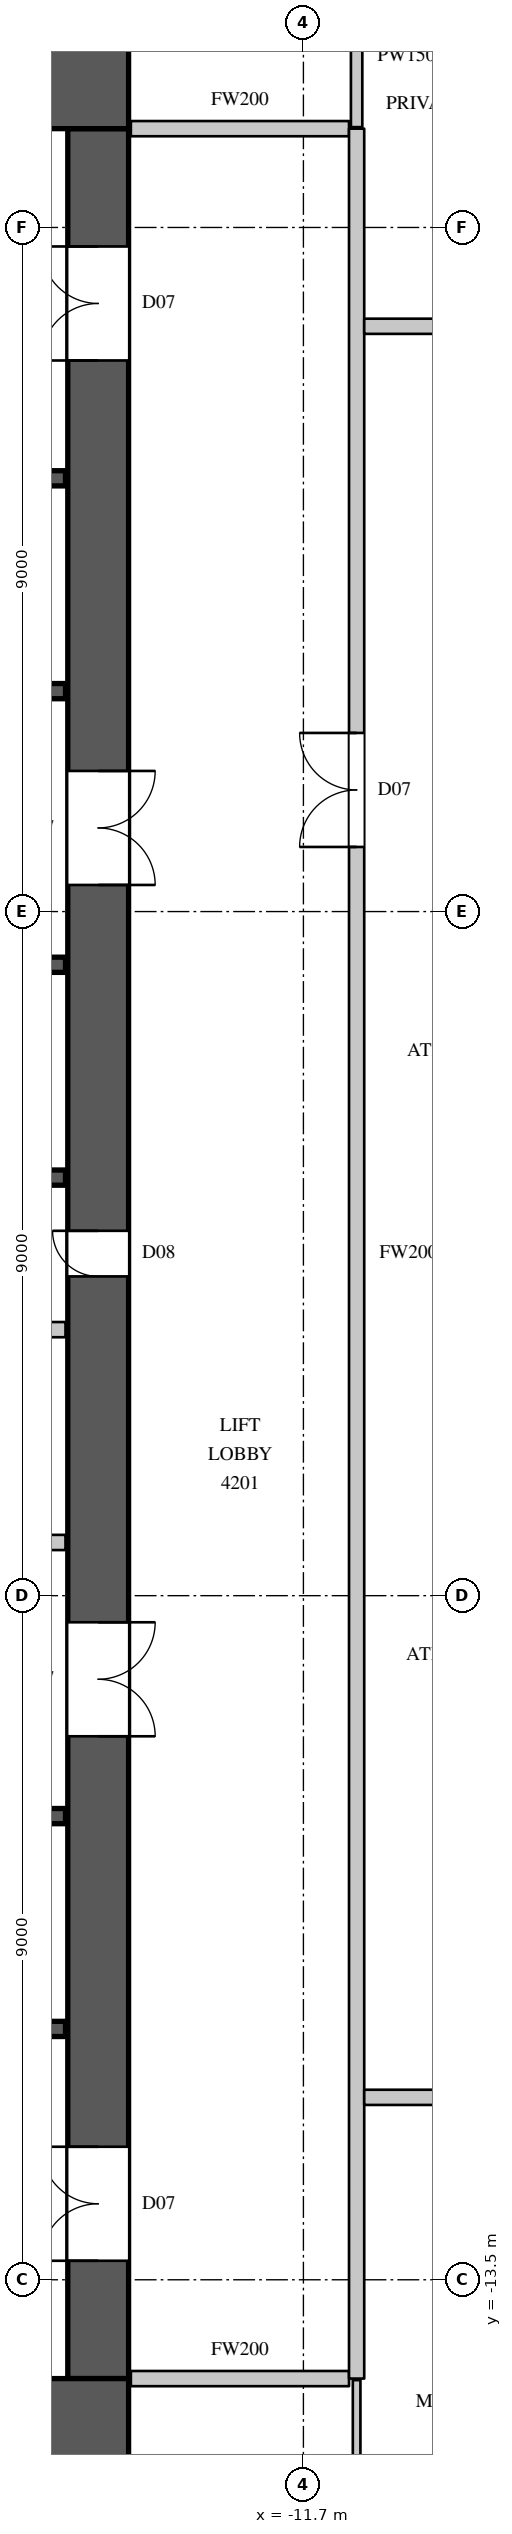
"""IFC4 building model, lengths in metres.
Left out: names, types, materials, properties, quantities, classifications, styles, units other than length and angle.
Written with IfcOpenShell. Run it as: python <this file> out.ifc"""

import sys

from ifc_helpers import new_model, si_unit, direction, frame, frame_2d, origin, place, context, subcontext, project, spatial, rectangle, extrude, element, fill, save


model = new_model("IFC4")
c1 = context("Model", 3, precision=1e-05, world=origin(), true_north=direction((0.0, 1.0)))
c2 = subcontext(c1, "Body", "Model", "MODEL_VIEW")
j1 = project(units=[si_unit("LENGTHUNIT", "METRE"), si_unit("PLANEANGLEUNIT", "RADIAN")], contexts=[c1])
p1 = place(None, origin())
s1 = spatial("IfcSite", under=j1, at=p1, CompositionType="ELEMENT")
p2 = place(p1, origin())
s2 = spatial("IfcBuilding", under=s1, at=p2, CompositionType="ELEMENT")
p3 = place(p2, frame((0.0, 0.0, 193.3)))
s3 = spatial("IfcBuildingStorey", under=s2, at=p3, CompositionType="ELEMENT", Elevation=193.3)
for number, where, z_axis, x_axis in (
    (1, (-30.0, 15.4, 0.0), (0.0, 0.0, 1.0), (1.0, 0.0, 0.0)),
    (2, (-30.0, -15.4, 0.0), (0.0, 0.0, 1.0), (1.0, 0.0, 0.0)),
):
    element("IfcWall", number, at=place(p3, frame(where, z_axis=z_axis, x_axis=x_axis)), inside=s3, PredefinedType="SHEAR", context=c2, shape_type="SweptSolid", body=[
        extrude(rectangle(XDim=16.0, YDim=1.2, at=frame_2d((8.0, 0.0))), origin(), (0.0, 0.0, 1.0), 4.1),
    ])
p4 = place(p3, frame((-14.4, -14.8, 0.0), z_axis=(0.0, 0.0, 1.0), x_axis=(0.0, 1.0, 0.0)))
e3 = element("IfcWall", 3, at=p4, inside=s3, PredefinedType="SHEAR", context=c2, shape_type="SweptSolid", body=[
    extrude(rectangle(XDim=29.6, YDim=0.8, at=frame_2d((14.8, 0.0))), origin(), (0.0, 0.0, 1.0), 4.1),
])
p5 = place(p4, frame((1.55, 0.0, 0.0)))
e4 = element("IfcOpeningElement", 4, at=p5, cuts=e3, PredefinedType="OPENING", context=c2, shape_type="SweptSolid", body=[
    extrude(rectangle(XDim=1.5, YDim=2.4, at=frame_2d((0.75, 1.2))), frame((0.0, 0.41, 0.0), z_axis=(0.0, -1.0, 0.0), x_axis=(1.0, 0.0, 0.0)), (0.0, 0.0, 1.0), 0.82),
])
p6 = place(p4, frame((26.55, 0.0, 0.0)))
e5 = element("IfcOpeningElement", 5, at=p6, cuts=e3, PredefinedType="OPENING", context=c2, shape_type="SweptSolid", body=[
    extrude(rectangle(XDim=1.5, YDim=2.4, at=frame_2d((0.75, 1.2))), frame((0.0, 0.41, 0.0), z_axis=(0.0, -1.0, 0.0), x_axis=(1.0, 0.0, 0.0)), (0.0, 0.0, 1.0), 0.82),
])
p7 = place(p4, frame((8.45, 0.0, 0.0)))
e6 = element("IfcOpeningElement", 6, at=p7, cuts=e3, PredefinedType="OPENING", context=c2, shape_type="SweptSolid", body=[
    extrude(rectangle(XDim=1.5, YDim=2.4, at=frame_2d((0.75, 1.2))), frame((0.0, 0.41, 0.0), z_axis=(0.0, -1.0, 0.0), x_axis=(1.0, 0.0, 0.0)), (0.0, 0.0, 1.0), 0.82),
])
p8 = place(p4, frame((19.65, 0.0, 0.0)))
e7 = element("IfcOpeningElement", 7, at=p8, cuts=e3, PredefinedType="OPENING", context=c2, shape_type="SweptSolid", body=[
    extrude(rectangle(XDim=1.5, YDim=2.4, at=frame_2d((0.75, 1.2))), frame((0.0, 0.41, 0.0), z_axis=(0.0, -1.0, 0.0), x_axis=(1.0, 0.0, 0.0)), (0.0, 0.0, 1.0), 0.82),
])
p9 = place(p4, frame((14.5, 0.0, 0.0)))
e8 = element("IfcOpeningElement", 8, at=p9, cuts=e3, PredefinedType="OPENING", context=c2, shape_type="SweptSolid", body=[
    extrude(rectangle(XDim=0.6, YDim=2.0, at=frame_2d((0.3, 1.0))), frame((0.0, 0.41, 0.0), z_axis=(0.0, -1.0, 0.0), x_axis=(1.0, 0.0, 0.0)), (0.0, 0.0, 1.0), 0.82),
])
p10 = place(p3, frame((-23.02, -3.8, 0.0), z_axis=(0.0, 0.0, 1.0), x_axis=(1.0, 0.0, 0.0)))
e9 = element("IfcWall", 9, at=p10, inside=s3, PredefinedType="PARTITIONING", context=c2, shape_type="SweptSolid", body=[
    extrude(rectangle(XDim=8.19, YDim=0.2, at=frame_2d((4.095, 0.0))), origin(), (0.0, 0.0, 1.0), 3.8),
])
p11 = place(p10, frame((1.5, 0.0, 0.0)))
e10 = element("IfcOpeningElement", 10, at=p11, cuts=e9, PredefinedType="OPENING", context=c2, shape_type="SweptSolid", body=[
    extrude(rectangle(XDim=0.9, YDim=2.2, at=frame_2d((0.45, 1.1))), frame((0.0, 0.11, 0.0), z_axis=(0.0, -1.0, 0.0), x_axis=(1.0, 0.0, 0.0)), (0.0, 0.0, 1.0), 0.22),
])
p12 = place(p10, frame((5.45, 0.0, 0.0)))
e11 = element("IfcOpeningElement", 11, at=p12, cuts=e9, PredefinedType="OPENING", context=c2, shape_type="SweptSolid", body=[
    extrude(rectangle(XDim=0.9, YDim=2.2, at=frame_2d((0.45, 1.1))), frame((0.0, 0.11, 0.0), z_axis=(0.0, -1.0, 0.0), x_axis=(1.0, 0.0, 0.0)), (0.0, 0.0, 1.0), 0.22),
])
for number, where, z_axis, x_axis in (
    (12, (-13.97, -14.8, 0.0), (0.0, 0.0, 1.0), (1.0, 0.0, 0.0)),
    (13, (-13.97, 14.8, 0.0), (0.0, 0.0, 1.0), (1.0, 0.0, 0.0)),
):
    element("IfcWall", number, at=place(p3, frame(where, z_axis=z_axis, x_axis=x_axis)), inside=s3, PredefinedType="PARTITIONING", context=c2, shape_type="SweptSolid", body=[
        extrude(rectangle(XDim=2.87, YDim=0.2, at=frame_2d((1.435, 0.0))), origin(), (0.0, 0.0, 1.0), 3.8),
    ])
p13 = place(p3, frame((-11.0, -14.8, 0.0), z_axis=(0.0, 0.0, 1.0), x_axis=(0.0, 1.0, 0.0)))
e14 = element("IfcWall", 14, at=p13, inside=s3, PredefinedType="PARTITIONING", context=c2, shape_type="SweptSolid", body=[
    extrude(rectangle(XDim=29.6, YDim=0.2, at=frame_2d((14.8, 0.0))), origin(), (0.0, 0.0, 1.0), 3.8),
])
p14 = place(p13, frame((20.15, 0.0, 0.0)))
e15 = element("IfcOpeningElement", 15, at=p14, cuts=e14, PredefinedType="OPENING", context=c2, shape_type="SweptSolid", body=[
    extrude(rectangle(XDim=1.5, YDim=2.4, at=frame_2d((0.75, 1.2))), frame((0.0, 0.11, 0.0), z_axis=(0.0, -1.0, 0.0), x_axis=(1.0, 0.0, 0.0)), (0.0, 0.0, 1.0), 0.22),
])
p15 = place(p3, frame((-10.9, -11.1, 0.0), z_axis=(0.0, 0.0, 1.0), x_axis=(1.0, 0.0, 0.0)))
e16 = element("IfcWall", 16, at=p15, inside=s3, PredefinedType="PARTITIONING", context=c2, shape_type="SweptSolid", body=[
    extrude(rectangle(XDim=20.9, YDim=0.2, at=frame_2d((10.45, 0.0))), origin(), (0.0, 0.0, 1.0), 3.8),
])
p16 = place(p15, frame((1.1, 0.0, 0.0)))
e17 = element("IfcOpeningElement", 17, at=p16, cuts=e16, PredefinedType="OPENING", context=c2, shape_type="SweptSolid", body=[
    extrude(rectangle(XDim=0.9, YDim=2.2, at=frame_2d((0.45, 1.1))), frame((0.0, 0.11, 0.0), z_axis=(0.0, -1.0, 0.0), x_axis=(1.0, 0.0, 0.0)), (0.0, 0.0, 1.0), 0.22),
])
p17 = place(p15, frame((4.9, 0.0, 0.0)))
e18 = element("IfcOpeningElement", 18, at=p17, cuts=e16, PredefinedType="OPENING", context=c2, shape_type="SweptSolid", body=[
    extrude(rectangle(XDim=0.9, YDim=2.2, at=frame_2d((0.45, 1.1))), frame((0.0, 0.11, 0.0), z_axis=(0.0, -1.0, 0.0), x_axis=(1.0, 0.0, 0.0)), (0.0, 0.0, 1.0), 0.22),
])
p18 = place(p15, frame((7.25, 0.0, 0.0)))
e19 = element("IfcOpeningElement", 19, at=p18, cuts=e16, PredefinedType="OPENING", context=c2, shape_type="SweptSolid", body=[
    extrude(rectangle(XDim=0.9, YDim=2.2, at=frame_2d((0.45, 1.1))), frame((0.0, 0.11, 0.0), z_axis=(0.0, -1.0, 0.0), x_axis=(1.0, 0.0, 0.0)), (0.0, 0.0, 1.0), 0.22),
])
p19 = place(p15, frame((9.95, 0.0, 0.0)))
e20 = element("IfcOpeningElement", 20, at=p19, cuts=e16, PredefinedType="OPENING", context=c2, shape_type="SweptSolid", body=[
    extrude(rectangle(XDim=1.1, YDim=2.4, at=frame_2d((0.55, 1.2))), frame((0.0, 0.11, 0.0), z_axis=(0.0, -1.0, 0.0), x_axis=(1.0, 0.0, 0.0)), (0.0, 0.0, 1.0), 0.22),
])
p20 = place(p15, frame((16.3, 0.0, 0.0)))
e21 = element("IfcOpeningElement", 21, at=p20, cuts=e16, PredefinedType="OPENING", context=c2, shape_type="SweptSolid", body=[
    extrude(rectangle(XDim=1.1, YDim=2.4, at=frame_2d((0.55, 1.2))), frame((0.0, 0.11, 0.0), z_axis=(0.0, -1.0, 0.0), x_axis=(1.0, 0.0, 0.0)), (0.0, 0.0, 1.0), 0.22),
])
p21 = place(p3, frame((-10.9, 12.2, 0.0), z_axis=(0.0, 0.0, 1.0), x_axis=(1.0, 0.0, 0.0)))
e22 = element("IfcWall", 22, at=p21, inside=s3, PredefinedType="PARTITIONING", context=c2, shape_type="SweptSolid", body=[
    extrude(rectangle(XDim=3.704, YDim=0.2, at=frame_2d((1.852, 0.0))), origin(), (0.0, 0.0, 1.0), 3.8),
])
p22 = place(p21, frame((1.7, 0.0, 0.0)))
e23 = element("IfcOpeningElement", 23, at=p22, cuts=e22, PredefinedType="OPENING", context=c2, shape_type="SweptSolid", body=[
    extrude(rectangle(XDim=1.1, YDim=2.4, at=frame_2d((0.55, 1.2))), frame((0.0, 0.11, 0.0), z_axis=(0.0, -1.0, 0.0), x_axis=(1.0, 0.0, 0.0)), (0.0, 0.0, 1.0), 0.22),
])
p23 = place(p3, frame((-11.0, 14.82, 0.0), z_axis=(0.0, 0.0, 1.0), x_axis=(0.0, 1.0, 0.0)))
e24 = element("IfcWall", 24, at=p23, inside=s3, PredefinedType="PARTITIONING", context=c2, shape_type="SweptSolid", body=[
    extrude(rectangle(XDim=1.88, YDim=0.15, at=frame_2d((0.94, 0.0))), origin(), (0.0, 0.0, 1.0), 3.8),
])
p24 = place(p3, frame((-29.17, -1.0, 0.0), z_axis=(0.0, 0.0, 1.0), x_axis=(1.0, 0.0, 0.0)))
e25 = element("IfcWall", 25, at=p24, inside=s3, PredefinedType="PARTITIONING", context=c2, shape_type="SweptSolid", body=[
    extrude(rectangle(XDim=14.34, YDim=0.2, at=frame_2d((7.17, 0.0))), origin(), (0.0, 0.0, 1.0), 3.8),
])
p25 = place(p3, frame((-26.08, 1.0, 0.0), z_axis=(0.0, 0.0, 1.0), x_axis=(1.0, 0.0, 0.0)))
e26 = element("IfcWall", 26, at=p25, inside=s3, PredefinedType="SHEAR", context=c2, shape_type="SweptSolid", body=[
    extrude(rectangle(XDim=11.25, YDim=0.2, at=frame_2d((5.625, 0.0))), origin(), (0.0, 0.0, 1.0), 3.8),
])
p26 = place(p3, frame((-26.08, 3.8, 0.0), z_axis=(0.0, 0.0, 1.0), x_axis=(1.0, 0.0, 0.0)))
e27 = element("IfcWall", 27, at=p26, inside=s3, PredefinedType="SHEAR", context=c2, shape_type="SweptSolid", body=[
    extrude(rectangle(XDim=11.25, YDim=0.2, at=frame_2d((5.625, 0.0))), origin(), (0.0, 0.0, 1.0), 3.8),
])
p27 = place(p26, frame((0.8, 0.0, 0.0)))
e28 = element("IfcOpeningElement", 28, at=p27, cuts=e27, PredefinedType="OPENING", context=c2, shape_type="SweptSolid", body=[
    extrude(rectangle(XDim=1.1, YDim=2.2, at=frame_2d((0.55, 1.1))), frame((0.0, 0.11, 0.0), z_axis=(0.0, -1.0, 0.0), x_axis=(1.0, 0.0, 0.0)), (0.0, 0.0, 1.0), 0.22),
])
p28 = place(p26, frame((3.55, 0.0, 0.0)))
e29 = element("IfcOpeningElement", 29, at=p28, cuts=e27, PredefinedType="OPENING", context=c2, shape_type="SweptSolid", body=[
    extrude(rectangle(XDim=1.1, YDim=2.2, at=frame_2d((0.55, 1.1))), frame((0.0, 0.11, 0.0), z_axis=(0.0, -1.0, 0.0), x_axis=(1.0, 0.0, 0.0)), (0.0, 0.0, 1.0), 0.22),
])
p29 = place(p26, frame((6.25, 0.0, 0.0)))
e30 = element("IfcOpeningElement", 30, at=p29, cuts=e27, PredefinedType="OPENING", context=c2, shape_type="SweptSolid", body=[
    extrude(rectangle(XDim=1.1, YDim=2.2, at=frame_2d((0.55, 1.1))), frame((0.0, 0.11, 0.0), z_axis=(0.0, -1.0, 0.0), x_axis=(1.0, 0.0, 0.0)), (0.0, 0.0, 1.0), 0.22),
])
p30 = place(p26, frame((9.15, 0.0, 0.0)))
e31 = element("IfcOpeningElement", 31, at=p30, cuts=e27, PredefinedType="OPENING", context=c2, shape_type="SweptSolid", body=[
    extrude(rectangle(XDim=1.1, YDim=2.2, at=frame_2d((0.55, 1.1))), frame((0.0, 0.11, 0.0), z_axis=(0.0, -1.0, 0.0), x_axis=(1.0, 0.0, 0.0)), (0.0, 0.0, 1.0), 0.22),
])
p31 = place(p3, frame((-17.92, -10.2, 0.0), z_axis=(0.0, 0.0, 1.0), x_axis=(1.0, 0.0, 0.0)))
e32 = element("IfcWall", 32, at=p31, inside=s3, PredefinedType="SHEAR", context=c2, shape_type="SweptSolid", body=[
    extrude(rectangle(XDim=3.09, YDim=0.2, at=frame_2d((1.545, 0.0))), origin(), (0.0, 0.0, 1.0), 3.8),
])
p32 = place(p31, frame((1.0, 0.0, 0.0)))
e33 = element("IfcOpeningElement", 33, at=p32, cuts=e32, PredefinedType="OPENING", context=c2, shape_type="SweptSolid", body=[
    extrude(rectangle(XDim=1.1, YDim=2.2, at=frame_2d((0.55, 1.1))), frame((0.0, 0.11, 0.0), z_axis=(0.0, -1.0, 0.0), x_axis=(1.0, 0.0, 0.0)), (0.0, 0.0, 1.0), 0.22),
])
p33 = place(p3, frame((-17.9, -7.4, 0.0), z_axis=(0.0, 0.0, 1.0), x_axis=(1.0, 0.0, 0.0)))
e34 = element("IfcWall", 34, at=p33, inside=s3, PredefinedType="SHEAR", context=c2, shape_type="SweptSolid", body=[
    extrude(rectangle(XDim=3.07, YDim=0.2, at=frame_2d((1.535, 0.0))), origin(), (0.0, 0.0, 1.0), 3.8),
])
p34 = place(p3, frame((-17.92, 7.4, 0.0), z_axis=(0.0, 0.0, 1.0), x_axis=(1.0, 0.0, 0.0)))
e35 = element("IfcWall", 35, at=p34, inside=s3, PredefinedType="SHEAR", context=c2, shape_type="SweptSolid", body=[
    extrude(rectangle(XDim=3.09, YDim=0.2, at=frame_2d((1.545, 0.0))), origin(), (0.0, 0.0, 1.0), 3.8),
])
p35 = place(p3, frame((-17.92, 10.2, 0.0), z_axis=(0.0, 0.0, 1.0), x_axis=(1.0, 0.0, 0.0)))
e36 = element("IfcWall", 36, at=p35, inside=s3, PredefinedType="SHEAR", context=c2, shape_type="SweptSolid", body=[
    extrude(rectangle(XDim=3.09, YDim=0.2, at=frame_2d((1.545, 0.0))), origin(), (0.0, 0.0, 1.0), 3.8),
])
p36 = place(p35, frame((1.0, 0.0, 0.0)))
e37 = element("IfcOpeningElement", 37, at=p36, cuts=e36, PredefinedType="OPENING", context=c2, shape_type="SweptSolid", body=[
    extrude(rectangle(XDim=1.1, YDim=2.2, at=frame_2d((0.55, 1.1))), frame((0.0, 0.11, 0.0), z_axis=(0.0, -1.0, 0.0), x_axis=(1.0, 0.0, 0.0)), (0.0, 0.0, 1.0), 0.22),
])
p37 = place(p3, frame((-11.0, -16.7, 0.0), z_axis=(0.0, 0.0, 1.0), x_axis=(0.0, 1.0, 0.0)))
e38 = element("IfcWall", 38, at=p37, inside=s3, PredefinedType="PARTITIONING", context=c2, shape_type="SweptSolid", body=[
    extrude(rectangle(XDim=1.88, YDim=0.1, at=frame_2d((0.94, 0.0))), origin(), (0.0, 0.0, 1.0), 3.8),
])
p38 = place(p14, origin())
e39 = element("IfcDoor", 39, at=p38, inside=s3, OperationType="DOUBLE_DOOR_SINGLE_SWING", PredefinedType="DOOR", context=c2, shape_type="SweptSolid", body=[
    extrude(rectangle(XDim=1.5, YDim=2.4, at=frame_2d((0.75, 1.2))), frame((0.0, 0.025, 0.0), z_axis=(0.0, -1.0, 0.0), x_axis=(1.0, 0.0, 0.0)), (0.0, 0.0, 1.0), 0.05),
])
fill(e15, e39)
p39 = place(p5, origin())
e40 = element("IfcDoor", 40, at=p39, inside=s3, OperationType="DOUBLE_DOOR_SINGLE_SWING", PredefinedType="DOOR", context=c2, shape_type="SweptSolid", body=[
    extrude(rectangle(XDim=1.5, YDim=2.4, at=frame_2d((0.75, 1.2))), frame((0.0, 0.395, 0.0), z_axis=(0.0, -1.0, 0.0), x_axis=(1.0, 0.0, 0.0)), (0.0, 0.0, 1.0), 0.05),
])
fill(e4, e40)
p40 = place(p6, origin())
e41 = element("IfcDoor", 41, at=p40, inside=s3, OperationType="DOUBLE_DOOR_SINGLE_SWING", PredefinedType="DOOR", context=c2, shape_type="SweptSolid", body=[
    extrude(rectangle(XDim=1.5, YDim=2.4, at=frame_2d((0.75, 1.2))), frame((0.0, 0.395, 0.0), z_axis=(0.0, -1.0, 0.0), x_axis=(1.0, 0.0, 0.0)), (0.0, 0.0, 1.0), 0.05),
])
fill(e5, e41)
p41 = place(p7, origin())
e42 = element("IfcDoor", 42, at=p41, inside=s3, OperationType="DOUBLE_DOOR_SINGLE_SWING", PredefinedType="DOOR", context=c2, shape_type="SweptSolid", body=[
    extrude(rectangle(XDim=1.5, YDim=2.4, at=frame_2d((0.75, 1.2))), frame((0.0, -0.345, 0.0), z_axis=(0.0, -1.0, 0.0), x_axis=(1.0, 0.0, 0.0)), (0.0, 0.0, 1.0), 0.05),
])
fill(e6, e42)
p42 = place(p8, origin())
e43 = element("IfcDoor", 43, at=p42, inside=s3, OperationType="DOUBLE_DOOR_SINGLE_SWING", PredefinedType="DOOR", context=c2, shape_type="SweptSolid", body=[
    extrude(rectangle(XDim=1.5, YDim=2.4, at=frame_2d((0.75, 1.2))), frame((0.0, -0.345, 0.0), z_axis=(0.0, -1.0, 0.0), x_axis=(1.0, 0.0, 0.0)), (0.0, 0.0, 1.0), 0.05),
])
fill(e7, e43)
p43 = place(p9, origin())
e44 = element("IfcDoor", 44, at=p43, inside=s3, OperationType="SINGLE_SWING_RIGHT", PredefinedType="DOOR", context=c2, shape_type="SweptSolid", body=[
    extrude(rectangle(XDim=0.6, YDim=2.0, at=frame_2d((0.3, 1.0))), frame((0.0, 0.395, 0.0), z_axis=(0.0, -1.0, 0.0), x_axis=(1.0, 0.0, 0.0)), (0.0, 0.0, 1.0), 0.05),
])
fill(e8, e44)
save(model, sys.argv[1])
